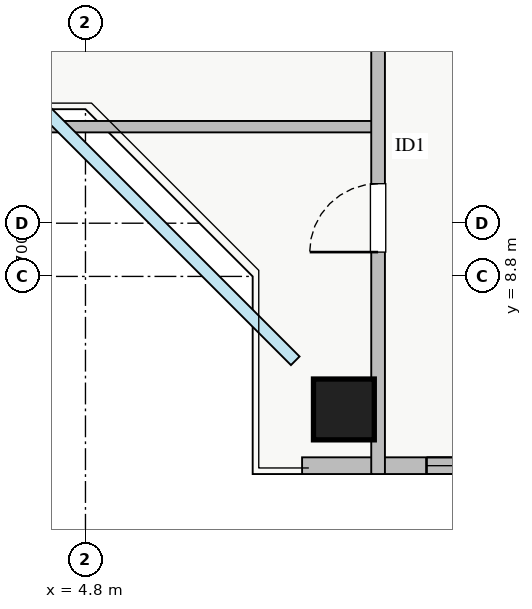
"""IFC4 building model, lengths in metres.
Left out: names, types, materials, properties, quantities, classifications, styles, units other than length and angle.
Written with IfcOpenShell. Run it as: python <this file> out.ifc"""

import sys

from ifc_helpers import new_model, si_unit, direction, frame, frame_2d, origin, origin_2d, place, context, subcontext, project, spatial, rectangle, extrude, source, transform, mapped, element, fill, save


model = new_model("IFC4")
c1 = context("Model", 3, precision=1e-05, world=origin(), true_north=direction((0.0, 1.0)))
c2 = subcontext(c1, "Body", "Model", "MODEL_VIEW")
j1 = project(units=[si_unit("LENGTHUNIT", "METRE"), si_unit("PLANEANGLEUNIT", "RADIAN")], contexts=[c1])
p1 = place(None, origin())
s1 = spatial("IfcSite", under=j1, at=p1, CompositionType="ELEMENT")
p2 = place(p1, origin())
s2 = spatial("IfcBuilding", under=s1, at=p2, CompositionType="ELEMENT")
p3 = place(p2, frame((0.0, 0.0, 197.0)))
s3 = spatial("IfcBuildingStorey", under=s2, at=p3, CompositionType="ELEMENT", Elevation=197.0)
m1 = source(origin(), c2, "Body", "SweptSolid", [
    extrude(rectangle(XDim=0.8, YDim=0.8, at=origin_2d()), origin(), (0.0, 0.0, 1.0), 3.25),
])
p4 = place(p3, frame((8.2, 7.05, 0.0), z_axis=(0.0, 0.0, 1.0), x_axis=(1.0, 0.0, 0.0)))
e1 = element("IfcColumn", 1, at=p4, inside=s3, PredefinedType="COLUMN", context=c2, shape_type="MappedRepresentation", body=[
    mapped(m1, transform((0.0, 0.0, 0.0), x_axis=(1.0, 0.0, 0.0), y_axis=(0.0, 1.0, 0.0), z_axis=(0.0, 0.0, 1.0), scale=1.0)),
])
p5 = place(p3, frame((7.65, 6.31, 0.0), z_axis=(0.0, 0.0, 1.0), x_axis=(1.0, 0.0, 0.0)))
e2 = element("IfcWall", 2, at=p5, inside=s3, PredefinedType="STANDARD", context=c2, shape_type="SweptSolid", body=[
    extrude(rectangle(XDim=22.7, YDim=0.22, at=frame_2d((11.35, 0.0))), origin(), (0.0, 0.0, 1.0), 2.61),
])
p6 = place(p5, frame((12.2, 0.0, 0.0)))
e3 = element("IfcOpeningElement", 3, at=p6, cuts=e2, PredefinedType="OPENING", context=c2, shape_type="SweptSolid", body=[
    extrude(rectangle(XDim=1.2, YDim=2.1, at=frame_2d((0.6, 1.05))), frame((0.0, 0.12, 0.0), z_axis=(0.0, -1.0, 0.0), x_axis=(1.0, 0.0, 0.0)), (0.0, 0.0, 1.0), 0.24),
])
p7 = place(p5, frame((1.637, 0.0, 0.9)))
e4 = element("IfcOpeningElement", 4, at=p7, cuts=e2, PredefinedType="OPENING", context=c2, shape_type="SweptSolid", body=[
    extrude(rectangle(XDim=2.4, YDim=1.48, at=frame_2d((1.2, 0.74))), frame((0.0, 0.12, 0.0), z_axis=(0.0, -1.0, 0.0), x_axis=(1.0, 0.0, 0.0)), (0.0, 0.0, 1.0), 0.24),
])
p8 = place(p5, frame((7.612, 0.0, 0.9)))
e5 = element("IfcOpeningElement", 5, at=p8, cuts=e2, PredefinedType="OPENING", context=c2, shape_type="SweptSolid", body=[
    extrude(rectangle(XDim=1.8, YDim=1.45, at=frame_2d((0.9, 0.725))), frame((0.0, 0.12, 0.0), z_axis=(0.0, -1.0, 0.0), x_axis=(1.0, 0.0, 0.0)), (0.0, 0.0, 1.0), 0.24),
])
p9 = place(p5, frame((20.238, 0.0, 0.9)))
e6 = element("IfcOpeningElement", 6, at=p9, cuts=e2, PredefinedType="OPENING", context=c2, shape_type="SweptSolid", body=[
    extrude(rectangle(XDim=2.1, YDim=1.5, at=frame_2d((1.05, 0.75))), frame((0.0, 0.12, 0.0), z_axis=(0.0, -1.0, 0.0), x_axis=(1.0, 0.0, 0.0)), (0.0, 0.0, 1.0), 0.24),
])
p10 = place(p5, frame((17.02, 0.0, 0.9)))
e7 = element("IfcOpeningElement", 7, at=p10, cuts=e2, PredefinedType="OPENING", context=c2, shape_type="SweptSolid", body=[
    extrude(rectangle(XDim=2.4, YDim=1.5, at=frame_2d((1.2, 0.75))), frame((0.0, 0.12, 0.0), z_axis=(0.0, -1.0, 0.0), x_axis=(1.0, 0.0, 0.0)), (0.0, 0.0, 1.0), 0.24),
])
p11 = place(p3, frame((2.45, 10.77, 0.0), z_axis=(0.0, 0.0, 1.0), x_axis=(1.0, 0.0, 0.0)))
e8 = element("IfcWall", 8, at=p11, inside=s3, PredefinedType="PARTITIONING", context=c2, shape_type="SweptSolid", body=[
    extrude(rectangle(XDim=6.2, YDim=0.15, at=frame_2d((3.1, 0.0))), origin(), (0.0, 0.0, 1.0), 3.07),
])
p12 = place(p3, frame((8.65, 6.2, 0.0), z_axis=(0.0, 0.0, 1.0), x_axis=(0.0, 1.0, 0.0)))
e9 = element("IfcWall", 9, at=p12, inside=s3, PredefinedType="PARTITIONING", context=c2, shape_type="SweptSolid", body=[
    extrude(rectangle(XDim=33.6, YDim=0.18, at=frame_2d((16.8, 0.0))), origin(), (0.0, 0.0, 1.0), 3.07),
])
p13 = place(p12, frame((29.605, 0.0, 0.0)))
e10 = element("IfcOpeningElement", 10, at=p13, cuts=e9, PredefinedType="OPENING", context=c2, shape_type="SweptSolid", body=[
    extrude(rectangle(XDim=0.9, YDim=2.05, at=frame_2d((0.45, 1.025))), frame((0.0, 0.1, 0.0), z_axis=(0.0, -1.0, 0.0), x_axis=(1.0, 0.0, 0.0)), (0.0, 0.0, 1.0), 0.2),
])
p14 = place(p12, frame((2.92, 0.0, 0.0)))
e11 = element("IfcOpeningElement", 11, at=p14, cuts=e9, PredefinedType="OPENING", context=c2, shape_type="SweptSolid", body=[
    extrude(rectangle(XDim=0.9, YDim=2.05, at=frame_2d((0.45, 1.025))), frame((0.0, 0.1, 0.0), z_axis=(0.0, -1.0, 0.0), x_axis=(1.0, 0.0, 0.0)), (0.0, 0.0, 1.0), 0.2),
])
p15 = place(p12, frame((6.965, 0.0, 0.0)))
e12 = element("IfcOpeningElement", 12, at=p15, cuts=e9, PredefinedType="OPENING", context=c2, shape_type="SweptSolid", body=[
    extrude(rectangle(XDim=1.0, YDim=2.05, at=frame_2d((0.5, 1.025))), frame((0.0, 0.1, 0.0), z_axis=(0.0, -1.0, 0.0), x_axis=(1.0, 0.0, 0.0)), (0.0, 0.0, 1.0), 0.2),
])
p16 = place(p12, frame((18.595, 0.0, 0.0)))
e13 = element("IfcOpeningElement", 13, at=p16, cuts=e9, PredefinedType="OPENING", context=c2, shape_type="SweptSolid", body=[
    extrude(rectangle(XDim=1.0, YDim=2.05, at=frame_2d((0.5, 1.025))), frame((0.0, 0.1, 0.0), z_axis=(0.0, -1.0, 0.0), x_axis=(1.0, 0.0, 0.0)), (0.0, 0.0, 1.0), 0.2),
])
m2 = source(origin(), c2, "Body", "SweptSolid", [
    extrude(rectangle(XDim=2.4, YDim=1.48, at=frame_2d((1.2, 0.74))), frame((0.0, 0.03, 0.0), z_axis=(0.0, -1.0, 0.0), x_axis=(1.0, 0.0, 0.0)), (0.0, 0.0, 1.0), 0.06),
])
p17 = place(p7, origin())
e14 = element("IfcWindow", 14, at=p17, inside=s3, PartitioningType="TRIPLE_PANEL_VERTICAL", PredefinedType="WINDOW", context=c2, shape_type="MappedRepresentation", body=[
    mapped(m2, transform((0.0, 0.0, 0.0), x_axis=(1.0, 0.0, 0.0), y_axis=(0.0, 1.0, 0.0), z_axis=(0.0, 0.0, 1.0), scale=1.0)),
])
fill(e4, e14)
m3 = source(origin(), c2, "Body", "SweptSolid", [
    extrude(rectangle(XDim=0.9, YDim=2.05, at=frame_2d((0.45, 1.025))), frame((0.0, 0.025, 0.0), z_axis=(0.0, -1.0, 0.0), x_axis=(1.0, 0.0, 0.0)), (0.0, 0.0, 1.0), 0.05),
])
p18 = place(p14, origin())
e15 = element("IfcDoor", 15, at=p18, inside=s3, OperationType="SINGLE_SWING_LEFT", PredefinedType="DOOR", context=c2, shape_type="MappedRepresentation", body=[
    mapped(m3, transform((0.0, 0.0, 0.0), x_axis=(1.0, 0.0, 0.0), y_axis=(0.0, 1.0, 0.0), z_axis=(0.0, 0.0, 1.0), scale=1.0)),
])
fill(e11, e15)
save(model, sys.argv[1])
